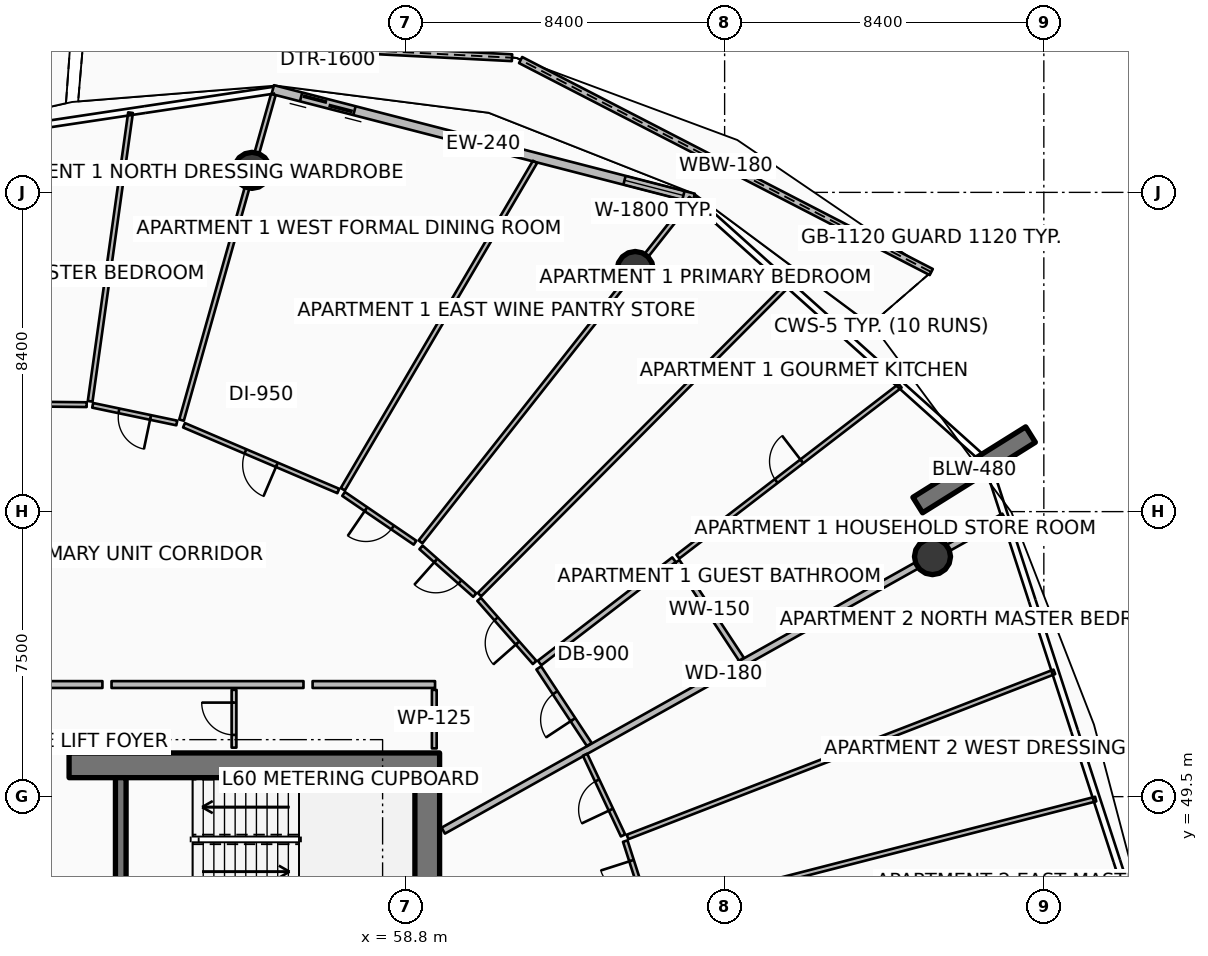
"""IFC4 building model, lengths in metres.
Left out: names, types, materials, properties, quantities, classifications, styles, units other than length and angle.
Written with IfcOpenShell. Run it as: python <this file> out.ifc"""

import sys

from ifc_helpers import new_model, si_unit, direction, frame, frame_2d, origin, origin_2d, place, context, subcontext, project, spatial, polyline, rectangle, circle, outline, extrude, element, fill, save


model = new_model("IFC4")
c1 = context("Model", 3, precision=1e-05, world=origin(), true_north=direction((0.0, 1.0)))
c2 = subcontext(c1, "Body", "Model", "MODEL_VIEW")
j1 = project(units=[si_unit("LENGTHUNIT", "METRE"), si_unit("PLANEANGLEUNIT", "RADIAN")], contexts=[c1])
p1 = place(None, origin())
s1 = spatial("IfcSite", under=j1, at=p1, CompositionType="ELEMENT")
p2 = place(p1, origin())
s2 = spatial("IfcBuilding", under=s1, at=p2, CompositionType="ELEMENT")
p3 = place(p2, frame((0.0, 0.0, 240.55)))
s3 = spatial("IfcBuildingStorey", under=s2, at=p3, CompositionType="ELEMENT", Elevation=240.55)
p4 = place(p3, frame((49.95, 50.325, 0.0), z_axis=(0.0, 0.0, 1.0), x_axis=(1.0, 0.0, 0.0)))
e1 = element("IfcWall", 1, at=p4, inside=s3, PredefinedType="SHEAR", context=c2, shape_type="SweptSolid", body=[
    extrude(rectangle(XDim=9.75, YDim=0.65, at=frame_2d((4.875, 0.0))), origin(), (0.0, 0.0, 1.0), 3.85),
])
p5 = place(p3, frame((59.375, 34.0, 0.0), z_axis=(0.0, 0.0, 1.0), x_axis=(0.0, 1.0, 0.0)))
e2 = element("IfcWall", 2, at=p5, inside=s3, PredefinedType="SHEAR", context=c2, shape_type="SweptSolid", body=[
    extrude(rectangle(XDim=16.0, YDim=0.65, at=frame_2d((8.0, 0.0))), origin(), (0.0, 0.0, 1.0), 3.85),
])
p6 = place(p3, frame((51.31, 46.5, 0.0), z_axis=(0.0, 0.0, 1.0), x_axis=(0.0, 1.0, 0.0)))
e3 = element("IfcWall", 3, at=p6, inside=s3, PredefinedType="SHEAR", context=c2, shape_type="SweptSolid", body=[
    extrude(rectangle(XDim=3.5, YDim=0.28, at=frame_2d((1.75, 0.0))), origin(), (0.0, 0.0, 1.0), 3.85),
])
p7 = place(p3, frame((72.281, 57.173, 0.0), z_axis=(0.0, 0.0, 1.0), x_axis=(0.848033572426, 0.529942506352, 0.0)))
e4 = element("IfcWall", 4, at=p7, inside=s3, PredefinedType="SOLIDWALL", context=c2, shape_type="SweptSolid", body=[
    extrude(rectangle(XDim=3.5, YDim=0.48, at=frame_2d((1.75, 0.0))), origin(), (0.0, 0.0, 1.0), 3.85),
])
for number, where, z_axis, x_axis in (
    (5, (72.67, 55.816, 0.0), (0.0, 0.0, 1.0), (1.0, 0.0, 0.0)),
    (6, (64.847, 63.371, 0.0), (0.0, 0.0, 1.0), (1.0, 0.0, 0.0)),
    (7, (54.763, 65.979, 0.0), (0.0, 0.0, 1.0), (1.0, 0.0, 0.0)),
):
    element("IfcColumn", number, at=place(p3, frame(where, z_axis=z_axis, x_axis=x_axis)), inside=s3, PredefinedType="COLUMN", context=c2, shape_type="SweptSolid", body=[
        extrude(circle(Radius=0.475, at=origin_2d()), origin(), (0.0, 0.0, 1.0), 3.59),
    ])
p8 = place(p3, frame((72.637, 63.304, 0.0), z_axis=(0.0, 0.0, 1.0), x_axis=(-0.888586869338, 0.458708377556, 0.0)))
e8 = element("IfcWall", 8, at=p8, inside=s3, PredefinedType="PARAPET", context=c2, shape_type="SweptSolid", body=[
    extrude(outline(polyline([(0.0, 0.0), (12.16, 0.0), (12.16, 1.148), (6.08, 1.284), (0.0, 1.483), (0.0, 0.0)])), frame((0.0, 0.09, 0.0), z_axis=(0.0, -1.0, 0.0), x_axis=(1.0, 0.0, 0.0)), (0.0, 0.0, 1.0), 0.18),
])
p9 = place(p3, frame((61.605, 68.943, 0.0), z_axis=(0.0, 0.0, 1.0), x_axis=(-0.998675719667, 0.051447127692, 0.0)))
e9 = element("IfcWall", 9, at=p9, inside=s3, PredefinedType="PARAPET", context=c2, shape_type="SweptSolid", body=[
    extrude(outline(polyline([(0.0, 0.0), (11.285, 0.0), (11.285, 1.224), (5.642, 1.127), (0.0, 1.148), (0.0, 0.0)])), frame((0.0, 0.09, 0.0), z_axis=(0.0, -1.0, 0.0), x_axis=(1.0, 0.0, 0.0)), (0.0, 0.0, 1.0), 0.18),
])
p10 = place(p3, frame((49.994, 69.486, 0.0), z_axis=(0.0, 0.0, 1.0), x_axis=(-0.980919619001, -0.194413736807, 0.0)))
e10 = element("IfcWall", 10, at=p10, inside=s3, PredefinedType="PARAPET", context=c2, shape_type="SweptSolid", body=[
    extrude(outline(polyline([(0.0, 0.0), (10.344, 0.0), (10.344, 1.632), (5.172, 1.418), (0.0, 1.233), (0.0, 0.0)])), frame((0.0, 0.09, 0.0), z_axis=(0.0, -1.0, 0.0), x_axis=(1.0, 0.0, 0.0)), (0.0, 0.0, 1.0), 0.18),
])
p11 = place(p3, frame((66.386, 65.249, 0.0), z_axis=(0.0, 0.0, 1.0), x_axis=(-0.968343758421, 0.249620442927, 0.0)))
e11 = element("IfcWall", 11, at=p11, inside=s3, PredefinedType="SOLIDWALL", context=c2, shape_type="SweptSolid", body=[
    extrude(rectangle(XDim=11.438, YDim=0.24, at=frame_2d((5.719, 0.0))), origin(), (0.0, 0.0, 1.0), 2.54),
])
p12 = place(p11, frame((9.218, 0.0, 0.0)))
e12 = element("IfcOpeningElement", 12, at=p12, cuts=e11, PredefinedType="OPENING", context=c2, shape_type="SweptSolid", body=[
    extrude(rectangle(XDim=1.45, YDim=2.15, at=frame_2d((0.725, 1.075))), frame((0.0, 0.13, 0.0), z_axis=(0.0, -1.0, 0.0), x_axis=(1.0, 0.0, 0.0)), (0.0, 0.0, 1.0), 0.26),
])
p13 = place(p11, frame((0.28, 0.0, 0.65)))
e13 = element("IfcOpeningElement", 13, at=p13, cuts=e11, PredefinedType="OPENING", context=c2, shape_type="SweptSolid", body=[
    extrude(rectangle(XDim=1.6, YDim=1.5, at=frame_2d((0.8, 0.75))), frame((0.0, 0.13, 0.0), z_axis=(0.0, -1.0, 0.0), x_axis=(1.0, 0.0, 0.0)), (0.0, 0.0, 1.0), 0.26),
])
p14 = place(p3, frame((59.56, 50.77, 0.0), z_axis=(0.0, 0.0, 1.0), x_axis=(0.0, 1.0, 0.0)))
e14 = element("IfcWall", 14, at=p14, inside=s3, PredefinedType="PARTITIONING", context=c2, shape_type="SweptSolid", body=[
    extrude(rectangle(XDim=1.54, YDim=0.125, at=frame_2d((0.77, 0.0))), origin(), (0.0, 0.0, 1.0), 3.03),
])
p15 = place(p3, frame((54.29, 50.79, 0.0), z_axis=(0.0, 0.0, 1.0), x_axis=(0.0, 1.0, 0.0)))
e15 = element("IfcWall", 15, at=p15, inside=s3, PredefinedType="PARTITIONING", context=c2, shape_type="SweptSolid", body=[
    extrude(rectangle(XDim=1.52, YDim=0.125, at=frame_2d((0.76, 0.0))), origin(), (0.0, 0.0, 1.0), 3.03),
])
p16 = place(p15, frame((0.335, 0.0, 0.0)))
e16 = element("IfcOpeningElement", 16, at=p16, cuts=e15, PredefinedType="OPENING", context=c2, shape_type="SweptSolid", body=[
    extrude(rectangle(XDim=0.85, YDim=2.06, at=frame_2d((0.425, 1.03))), frame((0.0, 0.073, 0.0), z_axis=(0.0, -1.0, 0.0), x_axis=(1.0, 0.0, 0.0)), (0.0, 0.0, 1.0), 0.145),
])
p17 = place(p3, frame((59.796, 48.606, 0.0), z_axis=(0.0, 0.0, 1.0), x_axis=(0.872493213488, 0.488626229767, 0.0)))
e17 = element("IfcWall", 17, at=p17, inside=s3, PredefinedType="PARTITIONING", context=c2, shape_type="SweptSolid", body=[
    extrude(rectangle(XDim=16.91, YDim=0.18, at=frame_2d((8.455, 0.0))), origin(), (0.0, 0.0, 1.0), 2.957),
])
p18 = place(p3, frame((59.58, 52.45, 0.0), z_axis=(0.0, 0.0, 1.0), x_axis=(-1.0, 0.0, 0.0)))
e18 = element("IfcWall", 18, at=p18, inside=s3, PredefinedType="PARTITIONING", context=c2, shape_type="SweptSolid", body=[
    extrude(rectangle(XDim=3.222, YDim=0.18, at=frame_2d((1.611, 0.0))), origin(), (0.0, 0.0, 1.0), 2.957),
])
p19 = place(p3, frame((63.639, 50.872, 0.0), z_axis=(0.0, 0.0, 1.0), x_axis=(-0.550539267926, 0.834809268319, 0.0)))
e19 = element("IfcWall", 19, at=p19, inside=s3, PredefinedType="PARTITIONING", context=c2, shape_type="SweptSolid", body=[
    extrude(rectangle(XDim=2.414, YDim=0.15, at=frame_2d((1.207, 0.0))), origin(), (0.0, 0.0, 1.0), 2.957),
])
p20 = place(p19, frame((0.782, 0.0, 0.0)))
e20 = element("IfcOpeningElement", 20, at=p20, cuts=e19, PredefinedType="OPENING", context=c2, shape_type="SweptSolid", body=[
    extrude(rectangle(XDim=0.85, YDim=2.06, at=frame_2d((0.425, 1.03))), frame((0.0, 0.085, 0.0), z_axis=(0.0, -1.0, 0.0), x_axis=(1.0, 0.0, 0.0)), (0.0, 0.0, 1.0), 0.17),
])
p21 = place(p3, frame((67.643, 53.115, 0.0), z_axis=(0.0, 0.0, 1.0), x_axis=(-0.550484224605, 0.834845565635, 0.0)))
e21 = element("IfcWall", 21, at=p21, inside=s3, PredefinedType="PARTITIONING", context=c2, shape_type="SweptSolid", body=[
    extrude(rectangle(XDim=3.079, YDim=0.15, at=frame_2d((1.54, 0.0))), origin(), (0.0, 0.0, 1.0), 2.957),
])
p22 = place(p3, frame((62.331, 53.018, 0.0), z_axis=(0.0, 0.0, 1.0), x_axis=(0.792803030826, 0.609477935871, 0.0)))
e22 = element("IfcWall", 22, at=p22, inside=s3, PredefinedType="PARTITIONING", context=c2, shape_type="SweptSolid", body=[
    extrude(rectangle(XDim=4.46, YDim=0.15, at=frame_2d((2.23, 0.0))), origin(), (0.0, 0.0, 1.0), 3.03),
])
p23 = place(p3, frame((65.97, 55.815, 0.0), z_axis=(0.0, 0.0, 1.0), x_axis=(0.792798660545, 0.609483620647, 0.0)))
e23 = element("IfcWall", 23, at=p23, inside=s3, PredefinedType="PARTITIONING", context=c2, shape_type="SweptSolid", body=[
    extrude(rectangle(XDim=7.377, YDim=0.125, at=frame_2d((3.688, 0.0))), origin(), (0.0, 0.0, 1.0), 3.03),
])
p24 = place(p23, frame((3.263, 0.0, 0.0)))
e24 = element("IfcOpeningElement", 24, at=p24, cuts=e23, PredefinedType="OPENING", context=c2, shape_type="SweptSolid", body=[
    extrude(rectangle(XDim=0.85, YDim=2.06, at=frame_2d((0.425, 1.03))), frame((0.0, 0.073, 0.0), z_axis=(0.0, -1.0, 0.0), x_axis=(1.0, 0.0, 0.0)), (0.0, 0.0, 1.0), 0.145),
])
p25 = place(p3, frame((60.749, 54.815, 0.0), z_axis=(0.0, 0.0, 1.0), x_axis=(0.705267705861, 0.708941085753, 0.0)))
e25 = element("IfcWall", 25, at=p25, inside=s3, PredefinedType="PARTITIONING", context=c2, shape_type="SweptSolid", body=[
    extrude(rectangle(XDim=11.498, YDim=0.125, at=frame_2d((5.749, 0.0))), origin(), (0.0, 0.0, 1.0), 3.03),
])
p26 = place(p3, frame((62.2, 53.031, 0.0), z_axis=(0.0, 0.0, 1.0), x_axis=(-0.660650282497, 0.750693815238, 0.0)))
e26 = element("IfcWall", 26, at=p26, inside=s3, PredefinedType="PARTITIONING", context=c2, shape_type="SweptSolid", body=[
    extrude(rectangle(XDim=2.212, YDim=0.125, at=frame_2d((1.106, 0.0))), origin(), (0.0, 0.0, 1.0), 3.03),
])
p27 = place(p26, frame((0.681, 0.0, 0.0)))
e27 = element("IfcOpeningElement", 27, at=p27, cuts=e26, PredefinedType="OPENING", context=c2, shape_type="SweptSolid", body=[
    extrude(rectangle(XDim=0.85, YDim=2.06, at=frame_2d((0.425, 1.03))), frame((0.0, 0.073, 0.0), z_axis=(0.0, -1.0, 0.0), x_axis=(1.0, 0.0, 0.0)), (0.0, 0.0, 1.0), 0.145),
])
p28 = place(p3, frame((60.626, 54.805, 0.0), z_axis=(0.0, 0.0, 1.0), x_axis=(-0.748419746602, 0.663225363581, 0.0)))
e28 = element("IfcWall", 28, at=p28, inside=s3, PredefinedType="PARTITIONING", context=c2, shape_type="SweptSolid", body=[
    extrude(rectangle(XDim=1.891, YDim=0.125, at=frame_2d((0.946, 0.0))), origin(), (0.0, 0.0, 1.0), 2.957),
])
p29 = place(p28, frame((0.521, 0.0, 0.0)))
e29 = element("IfcOpeningElement", 29, at=p29, cuts=e28, PredefinedType="OPENING", context=c2, shape_type="SweptSolid", body=[
    extrude(rectangle(XDim=0.85, YDim=2.06, at=frame_2d((0.425, 1.03))), frame((0.0, 0.073, 0.0), z_axis=(0.0, -1.0, 0.0), x_axis=(1.0, 0.0, 0.0)), (0.0, 0.0, 1.0), 0.145),
])
p30 = place(p3, frame((56.118, 52.45, 0.0), z_axis=(0.0, 0.0, 1.0), x_axis=(-1.0, 0.0, 0.0)))
e30 = element("IfcWall", 30, at=p30, inside=s3, PredefinedType="PARTITIONING", context=c2, shape_type="SweptSolid", body=[
    extrude(rectangle(XDim=5.051, YDim=0.18, at=frame_2d((2.525, 0.0))), origin(), (0.0, 0.0, 1.0), 2.957),
])
p31 = place(p3, frame((59.198, 56.204, 0.0), z_axis=(0.0, 0.0, 1.0), x_axis=(0.619101452742, 0.785311015593, 0.0)))
e31 = element("IfcWall", 31, at=p31, inside=s3, PredefinedType="PARTITIONING", context=c2, shape_type="SweptSolid", body=[
    extrude(rectangle(XDim=11.509, YDim=0.125, at=frame_2d((5.754, 0.0))), origin(), (0.0, 0.0, 1.0), 2.957),
])
p32 = place(p3, frame((57.153, 57.588, 0.0), z_axis=(0.0, 0.0, 1.0), x_axis=(0.506323477253, 0.862343630105, 0.0)))
e32 = element("IfcWall", 32, at=p32, inside=s3, PredefinedType="PARTITIONING", context=c2, shape_type="SweptSolid", body=[
    extrude(rectangle(XDim=9.988, YDim=0.125, at=frame_2d((4.994, 0.0))), origin(), (0.0, 0.0, 1.0), 3.03),
])
p33 = place(p3, frame((59.053, 56.182, 0.0), z_axis=(0.0, 0.0, 1.0), x_axis=(-0.825709590898, 0.56409544538, 0.0)))
e33 = element("IfcWall", 33, at=p33, inside=s3, PredefinedType="PARTITIONING", context=c2, shape_type="SweptSolid", body=[
    extrude(rectangle(XDim=2.276, YDim=0.125, at=frame_2d((1.138, 0.0))), origin(), (0.0, 0.0, 1.0), 2.957),
])
p34 = place(p33, frame((0.713, 0.0, 0.0)))
e34 = element("IfcOpeningElement", 34, at=p34, cuts=e33, PredefinedType="OPENING", context=c2, shape_type="SweptSolid", body=[
    extrude(rectangle(XDim=0.85, YDim=2.06, at=frame_2d((0.425, 1.03))), frame((0.0, 0.073, 0.0), z_axis=(0.0, -1.0, 0.0), x_axis=(1.0, 0.0, 0.0)), (0.0, 0.0, 1.0), 0.145),
])
p35 = place(p3, frame((57.034, 57.542, 0.0), z_axis=(0.0, 0.0, 1.0), x_axis=(-0.919921628857, 0.392102278445, 0.0)))
e35 = element("IfcWall", 35, at=p35, inside=s3, PredefinedType="PARTITIONING", context=c2, shape_type="SweptSolid", body=[
    extrude(rectangle(XDim=4.413, YDim=0.125, at=frame_2d((2.206, 0.0))), origin(), (0.0, 0.0, 1.0), 2.957),
])
p36 = place(p35, frame((1.756, 0.0, 0.0)))
e36 = element("IfcOpeningElement", 36, at=p36, cuts=e35, PredefinedType="OPENING", context=c2, shape_type="SweptSolid", body=[
    extrude(rectangle(XDim=0.9, YDim=2.08, at=frame_2d((0.45, 1.04))), frame((0.0, 0.073, 0.0), z_axis=(0.0, -1.0, 0.0), x_axis=(1.0, 0.0, 0.0)), (0.0, 0.0, 1.0), 0.145),
])
p37 = place(p3, frame((50.827, 52.45, 0.0), z_axis=(0.0, 0.0, 1.0), x_axis=(-1.0, 0.0, 0.0)))
e37 = element("IfcWall", 37, at=p37, inside=s3, PredefinedType="PARTITIONING", context=c2, shape_type="SweptSolid", body=[
    extrude(rectangle(XDim=3.944, YDim=0.18, at=frame_2d((1.972, 0.0))), origin(), (0.0, 0.0, 1.0), 2.957),
])
p38 = place(p3, frame((52.909, 59.408, 0.0), z_axis=(0.0, 0.0, 1.0), x_axis=(0.271454299549, 0.962451330331, 0.0)))
e38 = element("IfcWall", 38, at=p38, inside=s3, PredefinedType="PARTITIONING", context=c2, shape_type="SweptSolid", body=[
    extrude(rectangle(XDim=8.897, YDim=0.125, at=frame_2d((4.449, 0.0))), origin(), (0.0, 0.0, 1.0), 2.957),
])
p39 = place(p3, frame((50.505, 59.903, 0.0), z_axis=(0.0, 0.0, 1.0), x_axis=(0.138550424847, 0.990355380545, 0.0)))
e39 = element("IfcWall", 39, at=p39, inside=s3, PredefinedType="PARTITIONING", context=c2, shape_type="SweptSolid", body=[
    extrude(rectangle(XDim=7.669, YDim=0.125, at=frame_2d((3.834, 0.0))), origin(), (0.0, 0.0, 1.0), 3.03),
])
p40 = place(p3, frame((52.784, 59.332, 0.0), z_axis=(0.0, 0.0, 1.0), x_axis=(-0.978655016217, 0.205509997891, 0.0)))
e40 = element("IfcWall", 40, at=p40, inside=s3, PredefinedType="PARTITIONING", context=c2, shape_type="SweptSolid", body=[
    extrude(rectangle(XDim=2.262, YDim=0.125, at=frame_2d((1.131, 0.0))), origin(), (0.0, 0.0, 1.0), 2.957),
])
p41 = place(p40, frame((0.706, 0.0, 0.0)))
e41 = element("IfcOpeningElement", 41, at=p41, cuts=e40, PredefinedType="OPENING", context=c2, shape_type="SweptSolid", body=[
    extrude(rectangle(XDim=0.85, YDim=2.06, at=frame_2d((0.425, 1.03))), frame((0.0, 0.073, 0.0), z_axis=(0.0, -1.0, 0.0), x_axis=(1.0, 0.0, 0.0)), (0.0, 0.0, 1.0), 0.145),
])
p42 = place(p3, frame((50.412, 59.814, 0.0), z_axis=(0.0, 0.0, 1.0), x_axis=(-0.999943934923, 0.01058900422, 0.0)))
e42 = element("IfcWall", 42, at=p42, inside=s3, PredefinedType="PARTITIONING", context=c2, shape_type="SweptSolid", body=[
    extrude(rectangle(XDim=4.427, YDim=0.125, at=frame_2d((2.213, 0.0))), origin(), (0.0, 0.0, 1.0), 3.03),
])
p43 = place(p42, frame((1.763, 0.0, 0.0)))
e43 = element("IfcOpeningElement", 43, at=p43, cuts=e42, PredefinedType="OPENING", context=c2, shape_type="SweptSolid", body=[
    extrude(rectangle(XDim=0.9, YDim=2.08, at=frame_2d((0.45, 1.04))), frame((0.0, 0.073, 0.0), z_axis=(0.0, -1.0, 0.0), x_axis=(1.0, 0.0, 0.0)), (0.0, 0.0, 1.0), 0.145),
])
p44 = place(p3, frame((65.286, 46.438, 0.0), z_axis=(0.0, 0.0, 1.0), x_axis=(0.968583991447, 0.248686653265, 0.0)))
e44 = element("IfcWall", 44, at=p44, inside=s3, PredefinedType="PARTITIONING", context=c2, shape_type="SweptSolid", body=[
    extrude(rectangle(XDim=12.056, YDim=0.125, at=frame_2d((6.028, 0.0))), origin(), (0.0, 0.0, 1.0), 3.03),
])
p45 = place(p3, frame((64.645, 48.439, 0.0), z_axis=(0.0, 0.0, 1.0), x_axis=(0.93263897003, 0.360810963778, 0.0)))
e45 = element("IfcWall", 45, at=p45, inside=s3, PredefinedType="PARTITIONING", context=c2, shape_type="SweptSolid", body=[
    extrude(rectangle(XDim=12.043, YDim=0.125, at=frame_2d((6.021, 0.0))), origin(), (0.0, 0.0, 1.0), 3.03),
])
p46 = place(p3, frame((65.175, 46.492, 0.0), z_axis=(0.0, 0.0, 1.0), x_axis=(-0.305358332679, 0.952237516938, 0.0)))
e46 = element("IfcWall", 46, at=p46, inside=s3, PredefinedType="PARTITIONING", context=c2, shape_type="SweptSolid", body=[
    extrude(rectangle(XDim=1.931, YDim=0.125, at=frame_2d((0.965, 0.0))), origin(), (0.0, 0.0, 1.0), 3.03),
])
p47 = place(p46, frame((0.54, 0.0, 0.0)))
e47 = element("IfcOpeningElement", 47, at=p47, cuts=e46, PredefinedType="OPENING", context=c2, shape_type="SweptSolid", body=[
    extrude(rectangle(XDim=0.85, YDim=2.06, at=frame_2d((0.425, 1.03))), frame((0.0, 0.073, 0.0), z_axis=(0.0, -1.0, 0.0), x_axis=(1.0, 0.0, 0.0)), (0.0, 0.0, 1.0), 0.145),
])
p48 = place(p3, frame((64.527, 48.479, 0.0), z_axis=(0.0, 0.0, 1.0), x_axis=(-0.425751972865, 0.904839907167, 0.0)))
e48 = element("IfcWall", 48, at=p48, inside=s3, PredefinedType="PARTITIONING", context=c2, shape_type="SweptSolid", body=[
    extrude(rectangle(XDim=2.348, YDim=0.125, at=frame_2d((1.174, 0.0))), origin(), (0.0, 0.0, 1.0), 2.957),
])
p49 = place(p48, frame((0.749, 0.0, 0.0)))
e49 = element("IfcOpeningElement", 49, at=p49, cuts=e48, PredefinedType="OPENING", context=c2, shape_type="SweptSolid", body=[
    extrude(rectangle(XDim=0.85, YDim=2.06, at=frame_2d((0.425, 1.03))), frame((0.0, 0.073, 0.0), z_axis=(0.0, -1.0, 0.0), x_axis=(1.0, 0.0, 0.0)), (0.0, 0.0, 1.0), 0.145),
])
p50 = place(p12, origin())
e50 = element("IfcDoor", 50, at=p50, inside=s3, OperationType="DOUBLE_DOOR_SLIDING", PredefinedType="DOOR", context=c2, shape_type="SweptSolid", body=[
    extrude(rectangle(XDim=1.45, YDim=2.15, at=frame_2d((0.725, 1.075))), frame((0.0, 0.025, 0.0), z_axis=(0.0, -1.0, 0.0), x_axis=(1.0, 0.0, 0.0)), (0.0, 0.0, 1.0), 0.05),
])
fill(e12, e50)
p51 = place(p13, origin())
e51 = element("IfcWindow", 51, at=p51, inside=s3, PartitioningType="SINGLE_PANEL", PredefinedType="WINDOW", context=c2, shape_type="SweptSolid", body=[
    extrude(rectangle(XDim=1.6, YDim=1.5, at=frame_2d((0.8, 0.75))), frame((0.0, 0.03, 0.0), z_axis=(0.0, -1.0, 0.0), x_axis=(1.0, 0.0, 0.0)), (0.0, 0.0, 1.0), 0.06),
])
fill(e13, e51)
p52 = place(p16, origin())
e52 = element("IfcDoor", 52, at=p52, inside=s3, OperationType="SINGLE_SWING_RIGHT", PredefinedType="DOOR", context=c2, shape_type="SweptSolid", body=[
    extrude(rectangle(XDim=0.85, YDim=2.06, at=frame_2d((0.425, 1.03))), frame((0.0, 0.025, 0.0), z_axis=(0.0, -1.0, 0.0), x_axis=(1.0, 0.0, 0.0)), (0.0, 0.0, 1.0), 0.05),
])
fill(e16, e52)
p53 = place(p20, origin())
e53 = element("IfcDoor", 53, at=p53, inside=s3, OperationType="SINGLE_SWING_LEFT", PredefinedType="DOOR", context=c2, shape_type="SweptSolid", body=[
    extrude(rectangle(XDim=0.85, YDim=2.06, at=frame_2d((0.425, 1.03))), frame((0.0, 0.025, 0.0), z_axis=(0.0, -1.0, 0.0), x_axis=(1.0, 0.0, 0.0)), (0.0, 0.0, 1.0), 0.05),
])
fill(e20, e53)
p54 = place(p24, origin())
e54 = element("IfcDoor", 54, at=p54, inside=s3, OperationType="SINGLE_SWING_RIGHT", PredefinedType="DOOR", context=c2, shape_type="SweptSolid", body=[
    extrude(rectangle(XDim=0.85, YDim=2.06, at=frame_2d((0.425, 1.03))), frame((0.0, 0.025, 0.0), z_axis=(0.0, -1.0, 0.0), x_axis=(1.0, 0.0, 0.0)), (0.0, 0.0, 1.0), 0.05),
])
fill(e24, e54)
p55 = place(p27, origin())
e55 = element("IfcDoor", 55, at=p55, inside=s3, OperationType="SINGLE_SWING_LEFT", PredefinedType="DOOR", context=c2, shape_type="SweptSolid", body=[
    extrude(rectangle(XDim=0.85, YDim=2.06, at=frame_2d((0.425, 1.03))), frame((0.0, 0.025, 0.0), z_axis=(0.0, -1.0, 0.0), x_axis=(1.0, 0.0, 0.0)), (0.0, 0.0, 1.0), 0.05),
])
fill(e27, e55)
p56 = place(p29, origin())
e56 = element("IfcDoor", 56, at=p56, inside=s3, OperationType="SINGLE_SWING_RIGHT", PredefinedType="DOOR", context=c2, shape_type="SweptSolid", body=[
    extrude(rectangle(XDim=0.85, YDim=2.06, at=frame_2d((0.425, 1.03))), frame((0.0, 0.025, 0.0), z_axis=(0.0, -1.0, 0.0), x_axis=(1.0, 0.0, 0.0)), (0.0, 0.0, 1.0), 0.05),
])
fill(e29, e56)
p57 = place(p34, origin())
e57 = element("IfcDoor", 57, at=p57, inside=s3, OperationType="SINGLE_SWING_RIGHT", PredefinedType="DOOR", context=c2, shape_type="SweptSolid", body=[
    extrude(rectangle(XDim=0.85, YDim=2.06, at=frame_2d((0.425, 1.03))), frame((0.0, 0.025, 0.0), z_axis=(0.0, -1.0, 0.0), x_axis=(1.0, 0.0, 0.0)), (0.0, 0.0, 1.0), 0.05),
])
fill(e34, e57)
p58 = place(p36, origin())
e58 = element("IfcDoor", 58, at=p58, inside=s3, OperationType="SINGLE_SWING_LEFT", PredefinedType="DOOR", context=c2, shape_type="SweptSolid", body=[
    extrude(rectangle(XDim=0.9, YDim=2.08, at=frame_2d((0.45, 1.04))), frame((0.0, 0.025, 0.0), z_axis=(0.0, -1.0, 0.0), x_axis=(1.0, 0.0, 0.0)), (0.0, 0.0, 1.0), 0.05),
])
fill(e36, e58)
p59 = place(p41, origin())
e59 = element("IfcDoor", 59, at=p59, inside=s3, OperationType="SINGLE_SWING_LEFT", PredefinedType="DOOR", context=c2, shape_type="SweptSolid", body=[
    extrude(rectangle(XDim=0.85, YDim=2.06, at=frame_2d((0.425, 1.03))), frame((0.0, 0.025, 0.0), z_axis=(0.0, -1.0, 0.0), x_axis=(1.0, 0.0, 0.0)), (0.0, 0.0, 1.0), 0.05),
])
fill(e41, e59)
p60 = place(p47, origin())
e60 = element("IfcDoor", 60, at=p60, inside=s3, OperationType="SINGLE_SWING_RIGHT", PredefinedType="DOOR", context=c2, shape_type="SweptSolid", body=[
    extrude(rectangle(XDim=0.85, YDim=2.06, at=frame_2d((0.425, 1.03))), frame((0.0, 0.025, 0.0), z_axis=(0.0, -1.0, 0.0), x_axis=(1.0, 0.0, 0.0)), (0.0, 0.0, 1.0), 0.05),
])
fill(e47, e60)
p61 = place(p49, origin())
e61 = element("IfcDoor", 61, at=p61, inside=s3, OperationType="SINGLE_SWING_LEFT", PredefinedType="DOOR", context=c2, shape_type="SweptSolid", body=[
    extrude(rectangle(XDim=0.85, YDim=2.06, at=frame_2d((0.425, 1.03))), frame((0.0, 0.025, 0.0), z_axis=(0.0, -1.0, 0.0), x_axis=(1.0, 0.0, 0.0)), (0.0, 0.0, 1.0), 0.05),
])
fill(e49, e61)
save(model, sys.argv[1])
